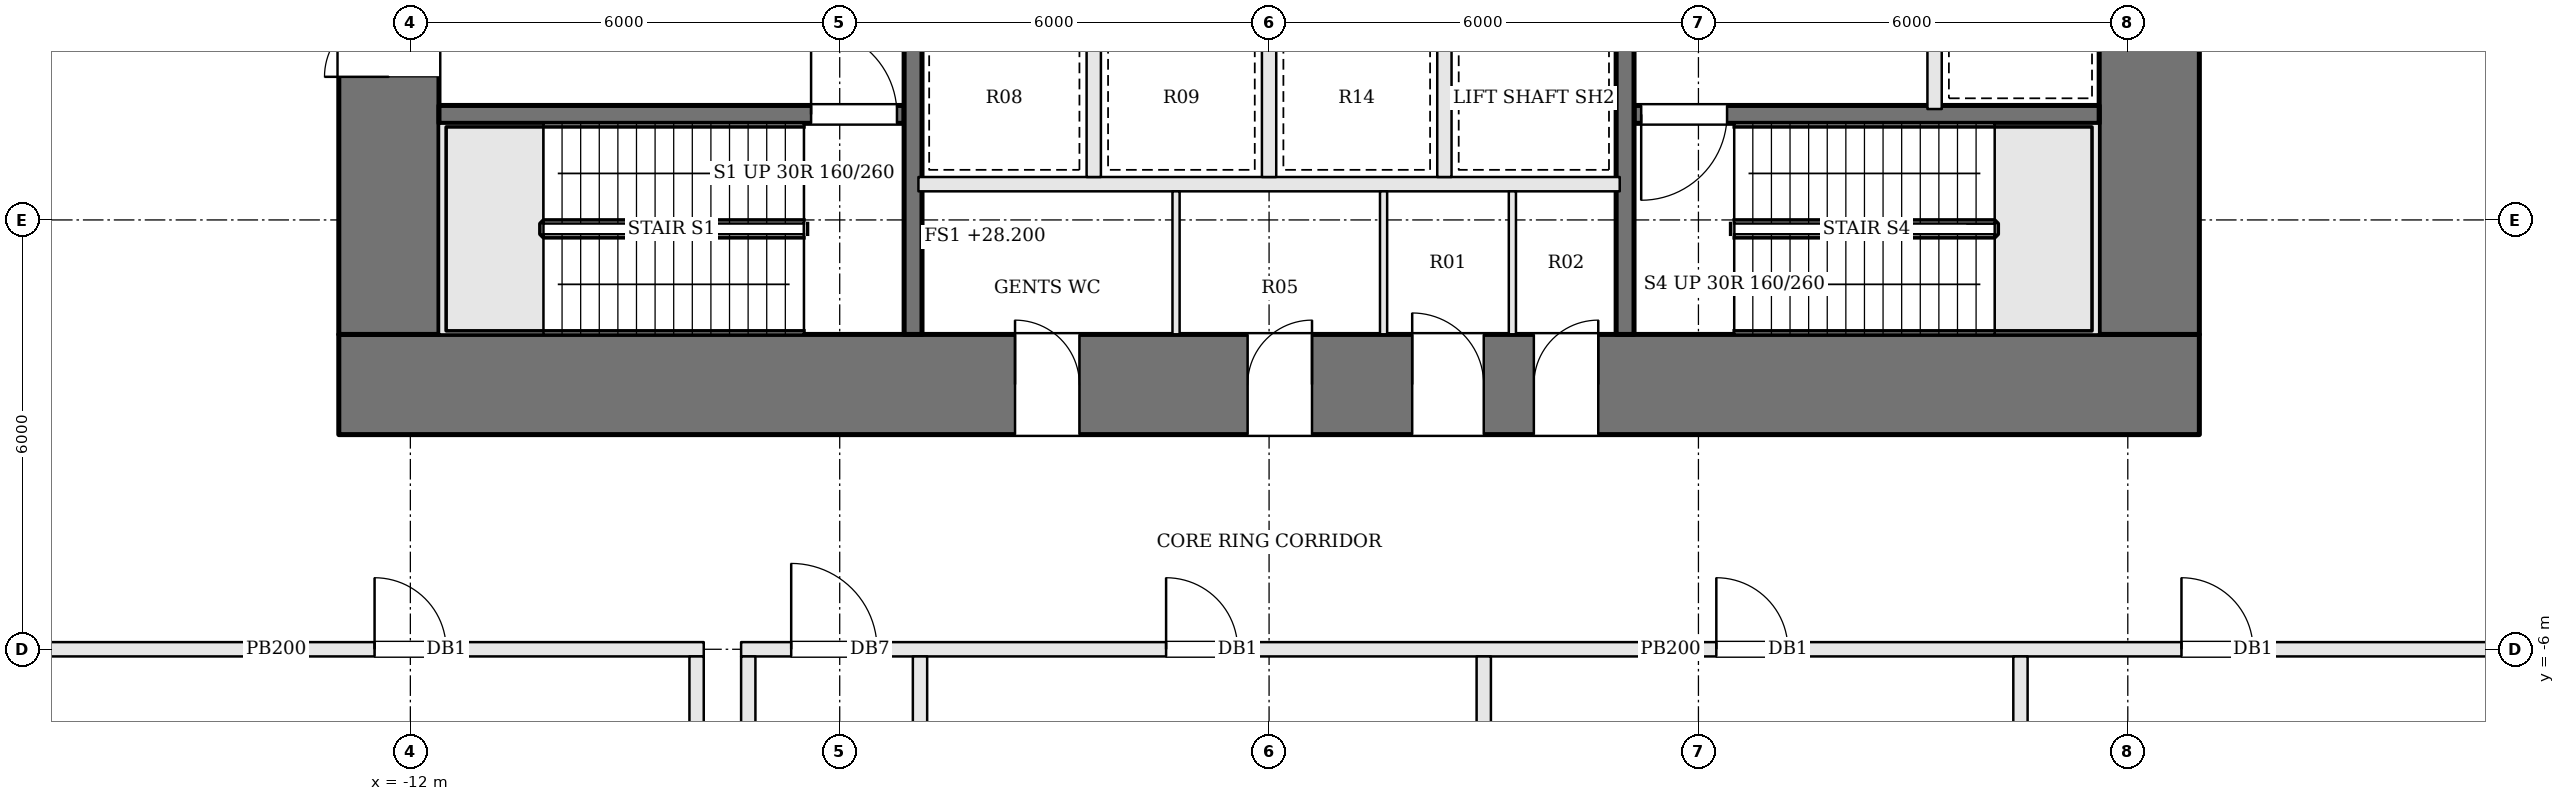
"""IFC4 building model, lengths in metres.
Left out: names, types, materials, properties, quantities, classifications, styles, units other than length and angle.
Written with IfcOpenShell. Run it as: python <this file> out.ifc"""

import sys

from ifc_helpers import new_model, si_unit, direction, frame, frame_2d, origin, place, context, subcontext, project, spatial, rectangle, extrude, element, fill, save


model = new_model("IFC4")
c1 = context("Model", 3, precision=1e-05, world=origin(), true_north=direction((0.0, 1.0)))
c2 = subcontext(c1, "Body", "Model", "MODEL_VIEW")
j1 = project(units=[si_unit("LENGTHUNIT", "METRE"), si_unit("PLANEANGLEUNIT", "RADIAN")], contexts=[c1])
p1 = place(None, origin())
s1 = spatial("IfcSite", under=j1, at=p1, CompositionType="ELEMENT")
p2 = place(p1, origin())
s2 = spatial("IfcBuilding", under=s1, at=p2, CompositionType="ELEMENT")
p3 = place(p2, frame((0.0, 0.0, 28.2)))
s3 = spatial("IfcBuildingStorey", under=s2, at=p3, CompositionType="ELEMENT", Elevation=28.2)
p4 = place(p3, frame((-13.0, -2.3, 0.0), z_axis=(0.0, 0.0, 1.0), x_axis=(1.0, 0.0, 0.0)))
e1 = element("IfcWall", 1, at=p4, inside=s3, PredefinedType="SHEAR", context=c2, shape_type="SweptSolid", body=[
    extrude(rectangle(XDim=26.0, YDim=1.4, at=frame_2d((13.0, 0.0))), origin(), (0.0, 0.0, 1.0), 4.8),
])
p5 = place(p4, frame((9.45, 0.0, 0.0)))
e2 = element("IfcOpeningElement", 2, at=p5, cuts=e1, PredefinedType="OPENING", context=c2, shape_type="SweptSolid", body=[
    extrude(rectangle(XDim=0.9, YDim=2.1, at=frame_2d((0.45, 1.05))), frame((0.0, 0.71, 0.0), z_axis=(0.0, -1.0, 0.0), x_axis=(1.0, 0.0, 0.0)), (0.0, 0.0, 1.0), 1.42),
])
p6 = place(p4, frame((12.7, 0.0, 0.0)))
e3 = element("IfcOpeningElement", 3, at=p6, cuts=e1, PredefinedType="OPENING", context=c2, shape_type="SweptSolid", body=[
    extrude(rectangle(XDim=0.9, YDim=2.1, at=frame_2d((0.45, 1.05))), frame((0.0, 0.71, 0.0), z_axis=(0.0, -1.0, 0.0), x_axis=(1.0, 0.0, 0.0)), (0.0, 0.0, 1.0), 1.42),
])
p7 = place(p4, frame((15.0, 0.0, 0.0)))
e4 = element("IfcOpeningElement", 4, at=p7, cuts=e1, PredefinedType="OPENING", context=c2, shape_type="SweptSolid", body=[
    extrude(rectangle(XDim=1.0, YDim=2.1, at=frame_2d((0.5, 1.05))), frame((0.0, 0.71, 0.0), z_axis=(0.0, -1.0, 0.0), x_axis=(1.0, 0.0, 0.0)), (0.0, 0.0, 1.0), 1.42),
])
p8 = place(p4, frame((16.7, 0.0, 0.0)))
e5 = element("IfcOpeningElement", 5, at=p8, cuts=e1, PredefinedType="OPENING", context=c2, shape_type="SweptSolid", body=[
    extrude(rectangle(XDim=0.9, YDim=2.1, at=frame_2d((0.45, 1.05))), frame((0.0, 0.71, 0.0), z_axis=(0.0, -1.0, 0.0), x_axis=(1.0, 0.0, 0.0)), (0.0, 0.0, 1.0), 1.42),
])
p9 = place(p3, frame((12.3, -1.6, 0.0), z_axis=(0.0, 0.0, 1.0), x_axis=(0.0, 1.0, 0.0)))
e6 = element("IfcWall", 6, at=p9, inside=s3, PredefinedType="SHEAR", context=c2, shape_type="SweptSolid", body=[
    extrude(rectangle(XDim=12.2, YDim=1.4, at=frame_2d((6.1, 0.0))), origin(), (0.0, 0.0, 1.0), 4.8),
])
p10 = place(p9, frame((6.8, 0.0, 0.0)))
e7 = element("IfcOpeningElement", 7, at=p10, cuts=e6, PredefinedType="OPENING", context=c2, shape_type="SweptSolid", body=[
    extrude(rectangle(XDim=1.8, YDim=2.1, at=frame_2d((0.9, 1.05))), frame((0.0, 0.71, 0.0), z_axis=(0.0, -1.0, 0.0), x_axis=(1.0, 0.0, 0.0)), (0.0, 0.0, 1.0), 1.42),
])
p11 = place(p3, frame((-12.3, -1.6, 0.0), z_axis=(0.0, 0.0, 1.0), x_axis=(0.0, 1.0, 0.0)))
e8 = element("IfcWall", 8, at=p11, inside=s3, PredefinedType="SHEAR", context=c2, shape_type="SweptSolid", body=[
    extrude(rectangle(XDim=12.2, YDim=1.4, at=frame_2d((6.1, 0.0))), origin(), (0.0, 0.0, 1.0), 4.8),
])
p12 = place(p11, frame((3.6, 0.0, 0.0)))
e9 = element("IfcOpeningElement", 9, at=p12, cuts=e8, PredefinedType="OPENING", context=c2, shape_type="SweptSolid", body=[
    extrude(rectangle(XDim=1.8, YDim=2.1, at=frame_2d((0.9, 1.05))), frame((0.0, 0.71, 0.0), z_axis=(0.0, -1.0, 0.0), x_axis=(1.0, 0.0, 0.0)), (0.0, 0.0, 1.0), 1.42),
])
p13 = place(p3, frame((-11.6, 1.475, 0.0), z_axis=(0.0, 0.0, 1.0), x_axis=(1.0, 0.0, 0.0)))
e10 = element("IfcWall", 10, at=p13, inside=s3, PredefinedType="SOLIDWALL", context=c2, shape_type="SweptSolid", body=[
    extrude(rectangle(XDim=6.5, YDim=0.25, at=frame_2d((3.25, 0.0))), origin(), (0.0, 0.0, 1.0), 4.5),
])
p14 = place(p13, frame((5.2, 0.0, 0.0)))
e11 = element("IfcOpeningElement", 11, at=p14, cuts=e10, PredefinedType="OPENING", context=c2, shape_type="SweptSolid", body=[
    extrude(rectangle(XDim=1.2, YDim=2.1, at=frame_2d((0.6, 1.05))), frame((0.0, 0.135, 0.0), z_axis=(0.0, -1.0, 0.0), x_axis=(1.0, 0.0, 0.0)), (0.0, 0.0, 1.0), 0.27),
])
p15 = place(p3, frame((11.6, 1.475, 0.0), z_axis=(0.0, 0.0, 1.0), x_axis=(-1.0, 0.0, 0.0)))
e12 = element("IfcWall", 12, at=p15, inside=s3, PredefinedType="SOLIDWALL", context=c2, shape_type="SweptSolid", body=[
    extrude(rectangle(XDim=6.5, YDim=0.25, at=frame_2d((3.25, 0.0))), origin(), (0.0, 0.0, 1.0), 4.5),
])
p16 = place(p15, frame((5.2, 0.0, 0.0)))
e13 = element("IfcOpeningElement", 13, at=p16, cuts=e12, PredefinedType="OPENING", context=c2, shape_type="SweptSolid", body=[
    extrude(rectangle(XDim=1.2, YDim=2.1, at=frame_2d((0.6, 1.05))), frame((0.0, 0.135, 0.0), z_axis=(0.0, -1.0, 0.0), x_axis=(1.0, 0.0, 0.0)), (0.0, 0.0, 1.0), 0.27),
])
p17 = place(p3, frame((9.3, 4.55, 0.0), z_axis=(0.0, 0.0, 1.0), x_axis=(0.0, -1.0, 0.0)))
e14 = element("IfcWall", 14, at=p17, inside=s3, PredefinedType="SOLIDWALL", context=c2, shape_type="SweptSolid", body=[
    extrude(rectangle(XDim=3.0, YDim=0.2, at=frame_2d((1.5, 0.0))), origin(), (0.0, 0.0, 1.0), 4.5),
])
p18 = place(p3, frame((-4.975, -1.6, 0.0), z_axis=(0.0, 0.0, 1.0), x_axis=(0.0, 1.0, 0.0)))
e15 = element("IfcWall", 15, at=p18, inside=s3, PredefinedType="SOLIDWALL", context=c2, shape_type="SweptSolid", body=[
    extrude(rectangle(XDim=12.2, YDim=0.25, at=frame_2d((6.1, 0.0))), origin(), (0.0, 0.0, 1.0), 4.5),
])
p19 = place(p18, frame((4.65, 0.0, 0.0)))
e16 = element("IfcOpeningElement", 16, at=p19, cuts=e15, PredefinedType="OPENING", context=c2, shape_type="SweptSolid", body=[
    extrude(rectangle(XDim=1.2, YDim=2.1, at=frame_2d((0.6, 1.05))), frame((0.0, 0.135, 0.0), z_axis=(0.0, -1.0, 0.0), x_axis=(1.0, 0.0, 0.0)), (0.0, 0.0, 1.0), 0.27),
])
p20 = place(p3, frame((4.975, 10.6, 0.0), z_axis=(0.0, 0.0, 1.0), x_axis=(0.0, -1.0, 0.0)))
e17 = element("IfcWall", 17, at=p20, inside=s3, PredefinedType="SOLIDWALL", context=c2, shape_type="SweptSolid", body=[
    extrude(rectangle(XDim=12.2, YDim=0.25, at=frame_2d((6.1, 0.0))), origin(), (0.0, 0.0, 1.0), 4.5),
])
p21 = place(p20, frame((4.65, 0.0, 0.0)))
e18 = element("IfcOpeningElement", 18, at=p21, cuts=e17, PredefinedType="OPENING", context=c2, shape_type="SweptSolid", body=[
    extrude(rectangle(XDim=1.2, YDim=2.1, at=frame_2d((0.6, 1.05))), frame((0.0, 0.135, 0.0), z_axis=(0.0, -1.0, 0.0), x_axis=(1.0, 0.0, 0.0)), (0.0, 0.0, 1.0), 0.27),
])
p22 = place(p3, frame((-4.9, 0.5, 0.0), z_axis=(0.0, 0.0, 1.0), x_axis=(1.0, 0.0, 0.0)))
e19 = element("IfcWall", 19, at=p22, inside=s3, PredefinedType="SOLIDWALL", context=c2, shape_type="SweptSolid", body=[
    extrude(rectangle(XDim=9.8, YDim=0.2, at=frame_2d((4.9, 0.0))), origin(), (0.0, 0.0, 1.0), 4.5),
])
for number, where, z_axis, x_axis in (
    (20, (-2.45, 0.6, 0.0), (0.0, 0.0, 1.0), (0.0, 1.0, 0.0)),
    (21, (0.0, 0.6, 0.0), (0.0, 0.0, 1.0), (0.0, 1.0, 0.0)),
    (22, (2.45, 0.6, 0.0), (0.0, 0.0, 1.0), (0.0, 1.0, 0.0)),
):
    element("IfcWall", number, at=place(p3, frame(where, z_axis=z_axis, x_axis=x_axis)), inside=s3, PredefinedType="SOLIDWALL", context=c2, shape_type="SweptSolid", body=[
        extrude(rectangle(XDim=2.2, YDim=0.2, at=frame_2d((1.1, 0.0))), origin(), (0.0, 0.0, 1.0), 4.5),
    ])
for number, where, z_axis, x_axis in (
    (23, (-1.3, -1.6, 0.0), (0.0, 0.0, 1.0), (0.0, 1.0, 0.0)),
    (24, (1.6, -1.6, 0.0), (0.0, 0.0, 1.0), (0.0, 1.0, 0.0)),
    (25, (3.4, -1.6, 0.0), (0.0, 0.0, 1.0), (0.0, 1.0, 0.0)),
):
    element("IfcWall", number, at=place(p3, frame(where, z_axis=z_axis, x_axis=x_axis)), inside=s3, PredefinedType="PARTITIONING", context=c2, shape_type="SweptSolid", body=[
        extrude(rectangle(XDim=2.0, YDim=0.1, at=frame_2d((1.0, 0.0))), origin(), (0.0, 0.0, 1.0), 4.5),
    ])
p23 = place(p3, frame((-7.378, -6.0, 0.0), z_axis=(0.0, 0.0, 1.0), x_axis=(1.0, 0.0, 0.0)))
e26 = element("IfcWall", 26, at=p23, inside=s3, PredefinedType="PARTITIONING", context=c2, shape_type="SweptSolid", body=[
    extrude(rectangle(XDim=25.978, YDim=0.2, at=frame_2d((12.989, 0.0))), origin(), (0.0, 0.0, 1.0), 3.78),
])
p24 = place(p23, frame((0.7, 0.0, 0.0)))
e27 = element("IfcOpeningElement", 27, at=p24, cuts=e26, PredefinedType="OPENING", context=c2, shape_type="SweptSolid", body=[
    extrude(rectangle(XDim=1.2, YDim=2.1, at=frame_2d((0.6, 1.05))), frame((0.0, 0.11, 0.0), z_axis=(0.0, -1.0, 0.0), x_axis=(1.0, 0.0, 0.0)), (0.0, 0.0, 1.0), 0.22),
])
p25 = place(p23, frame((5.939, 0.0, 0.0)))
e28 = element("IfcOpeningElement", 28, at=p25, cuts=e26, PredefinedType="OPENING", context=c2, shape_type="SweptSolid", body=[
    extrude(rectangle(XDim=1.0, YDim=2.1, at=frame_2d((0.5, 1.05))), frame((0.0, 0.11, 0.0), z_axis=(0.0, -1.0, 0.0), x_axis=(1.0, 0.0, 0.0)), (0.0, 0.0, 1.0), 0.22),
])
p26 = place(p23, frame((13.628, 0.0, 0.0)))
e29 = element("IfcOpeningElement", 29, at=p26, cuts=e26, PredefinedType="OPENING", context=c2, shape_type="SweptSolid", body=[
    extrude(rectangle(XDim=1.0, YDim=2.1, at=frame_2d((0.5, 1.05))), frame((0.0, 0.11, 0.0), z_axis=(0.0, -1.0, 0.0), x_axis=(1.0, 0.0, 0.0)), (0.0, 0.0, 1.0), 0.22),
])
p27 = place(p23, frame((20.128, 0.0, 0.0)))
e30 = element("IfcOpeningElement", 30, at=p27, cuts=e26, PredefinedType="OPENING", context=c2, shape_type="SweptSolid", body=[
    extrude(rectangle(XDim=1.0, YDim=2.1, at=frame_2d((0.5, 1.05))), frame((0.0, 0.11, 0.0), z_axis=(0.0, -1.0, 0.0), x_axis=(1.0, 0.0, 0.0)), (0.0, 0.0, 1.0), 0.22),
])
p28 = place(p3, frame((-4.878, -6.1, 0.0), z_axis=(0.0, 0.0, 1.0), x_axis=(0.0, -1.0, 0.0)))
e31 = element("IfcWall", 31, at=p28, inside=s3, PredefinedType="PARTITIONING", context=c2, shape_type="SweptSolid", body=[
    extrude(rectangle(XDim=13.331, YDim=0.2, at=frame_2d((6.666, 0.0))), origin(), (0.0, 0.0, 1.0), 3.78),
])
p29 = place(p3, frame((-7.278, -19.231, 0.0), z_axis=(0.0, 0.0, 1.0), x_axis=(0.0, 1.0, 0.0)))
e32 = element("IfcWall", 32, at=p29, inside=s3, PredefinedType="PARTITIONING", context=c2, shape_type="SweptSolid", body=[
    extrude(rectangle(XDim=13.131, YDim=0.2, at=frame_2d((6.565, 0.0))), origin(), (0.0, 0.0, 1.0), 3.78),
])
p30 = place(p3, frame((-19.85, -6.0, 0.0), z_axis=(0.0, 0.0, 1.0), x_axis=(1.0, 0.0, 0.0)))
e33 = element("IfcWall", 33, at=p30, inside=s3, PredefinedType="PARTITIONING", context=c2, shape_type="SweptSolid", body=[
    extrude(rectangle(XDim=11.95, YDim=0.2, at=frame_2d((5.975, 0.0))), origin(), (0.0, 0.0, 1.0), 3.78),
])
p31 = place(p30, frame((7.35, 0.0, 0.0)))
e34 = element("IfcOpeningElement", 34, at=p31, cuts=e33, PredefinedType="OPENING", context=c2, shape_type="SweptSolid", body=[
    extrude(rectangle(XDim=1.0, YDim=2.1, at=frame_2d((0.5, 1.05))), frame((0.0, 0.11, 0.0), z_axis=(0.0, -1.0, 0.0), x_axis=(1.0, 0.0, 0.0)), (0.0, 0.0, 1.0), 0.22),
])
p32 = place(p3, frame((-8.0, -6.1, 0.0), z_axis=(0.0, 0.0, 1.0), x_axis=(0.0, -1.0, 0.0)))
e35 = element("IfcWall", 35, at=p32, inside=s3, PredefinedType="PARTITIONING", context=c2, shape_type="SweptSolid", body=[
    extrude(rectangle(XDim=12.102, YDim=0.2, at=frame_2d((6.051, 0.0))), origin(), (0.0, 0.0, 1.0), 3.78),
])
p33 = place(p3, frame((3.0, -6.1, 0.0), z_axis=(0.0, 0.0, 1.0), x_axis=(0.0, -1.0, 0.0)))
e36 = element("IfcWall", 36, at=p33, inside=s3, PredefinedType="PARTITIONING", context=c2, shape_type="SweptSolid", body=[
    extrude(rectangle(XDim=12.626, YDim=0.2, at=frame_2d((6.313, 0.0))), origin(), (0.0, 0.0, 1.0), 3.78),
])
p34 = place(p3, frame((10.5, -6.1, 0.0), z_axis=(0.0, 0.0, 1.0), x_axis=(0.0, -1.0, 0.0)))
e37 = element("IfcWall", 37, at=p34, inside=s3, PredefinedType="PARTITIONING", context=c2, shape_type="SweptSolid", body=[
    extrude(rectangle(XDim=11.583, YDim=0.2, at=frame_2d((5.792, 0.0))), origin(), (0.0, 0.0, 1.0), 3.78),
])
p35 = place(p12, origin())
e38 = element("IfcDoor", 38, at=p35, inside=s3, OperationType="DOUBLE_DOOR_SINGLE_SWING", PredefinedType="DOOR", context=c2, shape_type="SweptSolid", body=[
    extrude(rectangle(XDim=1.8, YDim=2.1, at=frame_2d((0.9, 1.05))), frame((0.0, 0.025, 0.0), z_axis=(0.0, -1.0, 0.0), x_axis=(1.0, 0.0, 0.0)), (0.0, 0.0, 1.0), 0.05),
])
fill(e9, e38)
p36 = place(p14, origin())
e39 = element("IfcDoor", 39, at=p36, inside=s3, OperationType="SINGLE_SWING_LEFT", PredefinedType="DOOR", context=c2, shape_type="SweptSolid", body=[
    extrude(rectangle(XDim=1.2, YDim=2.1, at=frame_2d((0.6, 1.05))), frame((0.0, 0.025, 0.0), z_axis=(0.0, -1.0, 0.0), x_axis=(1.0, 0.0, 0.0)), (0.0, 0.0, 1.0), 0.05),
])
fill(e11, e39)
p37 = place(p16, origin())
e40 = element("IfcDoor", 40, at=p37, inside=s3, OperationType="SINGLE_SWING_RIGHT", PredefinedType="DOOR", context=c2, shape_type="SweptSolid", body=[
    extrude(rectangle(XDim=1.2, YDim=2.1, at=frame_2d((0.6, 1.05))), frame((0.0, 0.025, 0.0), z_axis=(0.0, -1.0, 0.0), x_axis=(1.0, 0.0, 0.0)), (0.0, 0.0, 1.0), 0.05),
])
fill(e13, e40)
p38 = place(p5, origin())
e41 = element("IfcDoor", 41, at=p38, inside=s3, OperationType="SINGLE_SWING_LEFT", PredefinedType="DOOR", context=c2, shape_type="SweptSolid", body=[
    extrude(rectangle(XDim=0.9, YDim=2.1, at=frame_2d((0.45, 1.05))), frame((0.0, 0.025, 0.0), z_axis=(0.0, -1.0, 0.0), x_axis=(1.0, 0.0, 0.0)), (0.0, 0.0, 1.0), 0.05),
])
fill(e2, e41)
p39 = place(p6, origin())
e42 = element("IfcDoor", 42, at=p39, inside=s3, OperationType="SINGLE_SWING_RIGHT", PredefinedType="DOOR", context=c2, shape_type="SweptSolid", body=[
    extrude(rectangle(XDim=0.9, YDim=2.1, at=frame_2d((0.45, 1.05))), frame((0.0, 0.025, 0.0), z_axis=(0.0, -1.0, 0.0), x_axis=(1.0, 0.0, 0.0)), (0.0, 0.0, 1.0), 0.05),
])
fill(e3, e42)
p40 = place(p7, origin())
e43 = element("IfcDoor", 43, at=p40, inside=s3, OperationType="SINGLE_SWING_LEFT", PredefinedType="DOOR", context=c2, shape_type="SweptSolid", body=[
    extrude(rectangle(XDim=1.0, YDim=2.1, at=frame_2d((0.5, 1.05))), frame((0.0, 0.025, 0.0), z_axis=(0.0, -1.0, 0.0), x_axis=(1.0, 0.0, 0.0)), (0.0, 0.0, 1.0), 0.05),
])
fill(e4, e43)
p41 = place(p8, origin())
e44 = element("IfcDoor", 44, at=p41, inside=s3, OperationType="SINGLE_SWING_RIGHT", PredefinedType="DOOR", context=c2, shape_type="SweptSolid", body=[
    extrude(rectangle(XDim=0.9, YDim=2.1, at=frame_2d((0.45, 1.05))), frame((0.0, 0.025, 0.0), z_axis=(0.0, -1.0, 0.0), x_axis=(1.0, 0.0, 0.0)), (0.0, 0.0, 1.0), 0.05),
])
fill(e5, e44)
p42 = place(p24, origin())
e45 = element("IfcDoor", 45, at=p42, inside=s3, OperationType="SINGLE_SWING_LEFT", PredefinedType="DOOR", context=c2, shape_type="SweptSolid", body=[
    extrude(rectangle(XDim=1.2, YDim=2.1, at=frame_2d((0.6, 1.05))), frame((0.0, 0.025, 0.0), z_axis=(0.0, -1.0, 0.0), x_axis=(1.0, 0.0, 0.0)), (0.0, 0.0, 1.0), 0.05),
])
fill(e27, e45)
p43 = place(p31, origin())
e46 = element("IfcDoor", 46, at=p43, inside=s3, OperationType="SINGLE_SWING_LEFT", PredefinedType="DOOR", context=c2, shape_type="SweptSolid", body=[
    extrude(rectangle(XDim=1.0, YDim=2.1, at=frame_2d((0.5, 1.05))), frame((0.0, 0.025, 0.0), z_axis=(0.0, -1.0, 0.0), x_axis=(1.0, 0.0, 0.0)), (0.0, 0.0, 1.0), 0.05),
])
fill(e34, e46)
p44 = place(p25, origin())
e47 = element("IfcDoor", 47, at=p44, inside=s3, OperationType="SINGLE_SWING_LEFT", PredefinedType="DOOR", context=c2, shape_type="SweptSolid", body=[
    extrude(rectangle(XDim=1.0, YDim=2.1, at=frame_2d((0.5, 1.05))), frame((0.0, 0.025, 0.0), z_axis=(0.0, -1.0, 0.0), x_axis=(1.0, 0.0, 0.0)), (0.0, 0.0, 1.0), 0.05),
])
fill(e28, e47)
p45 = place(p26, origin())
e48 = element("IfcDoor", 48, at=p45, inside=s3, OperationType="SINGLE_SWING_LEFT", PredefinedType="DOOR", context=c2, shape_type="SweptSolid", body=[
    extrude(rectangle(XDim=1.0, YDim=2.1, at=frame_2d((0.5, 1.05))), frame((0.0, 0.025, 0.0), z_axis=(0.0, -1.0, 0.0), x_axis=(1.0, 0.0, 0.0)), (0.0, 0.0, 1.0), 0.05),
])
fill(e29, e48)
p46 = place(p27, origin())
e49 = element("IfcDoor", 49, at=p46, inside=s3, OperationType="SINGLE_SWING_LEFT", PredefinedType="DOOR", context=c2, shape_type="SweptSolid", body=[
    extrude(rectangle(XDim=1.0, YDim=2.1, at=frame_2d((0.5, 1.05))), frame((0.0, 0.025, 0.0), z_axis=(0.0, -1.0, 0.0), x_axis=(1.0, 0.0, 0.0)), (0.0, 0.0, 1.0), 0.05),
])
fill(e30, e49)
save(model, sys.argv[1])
